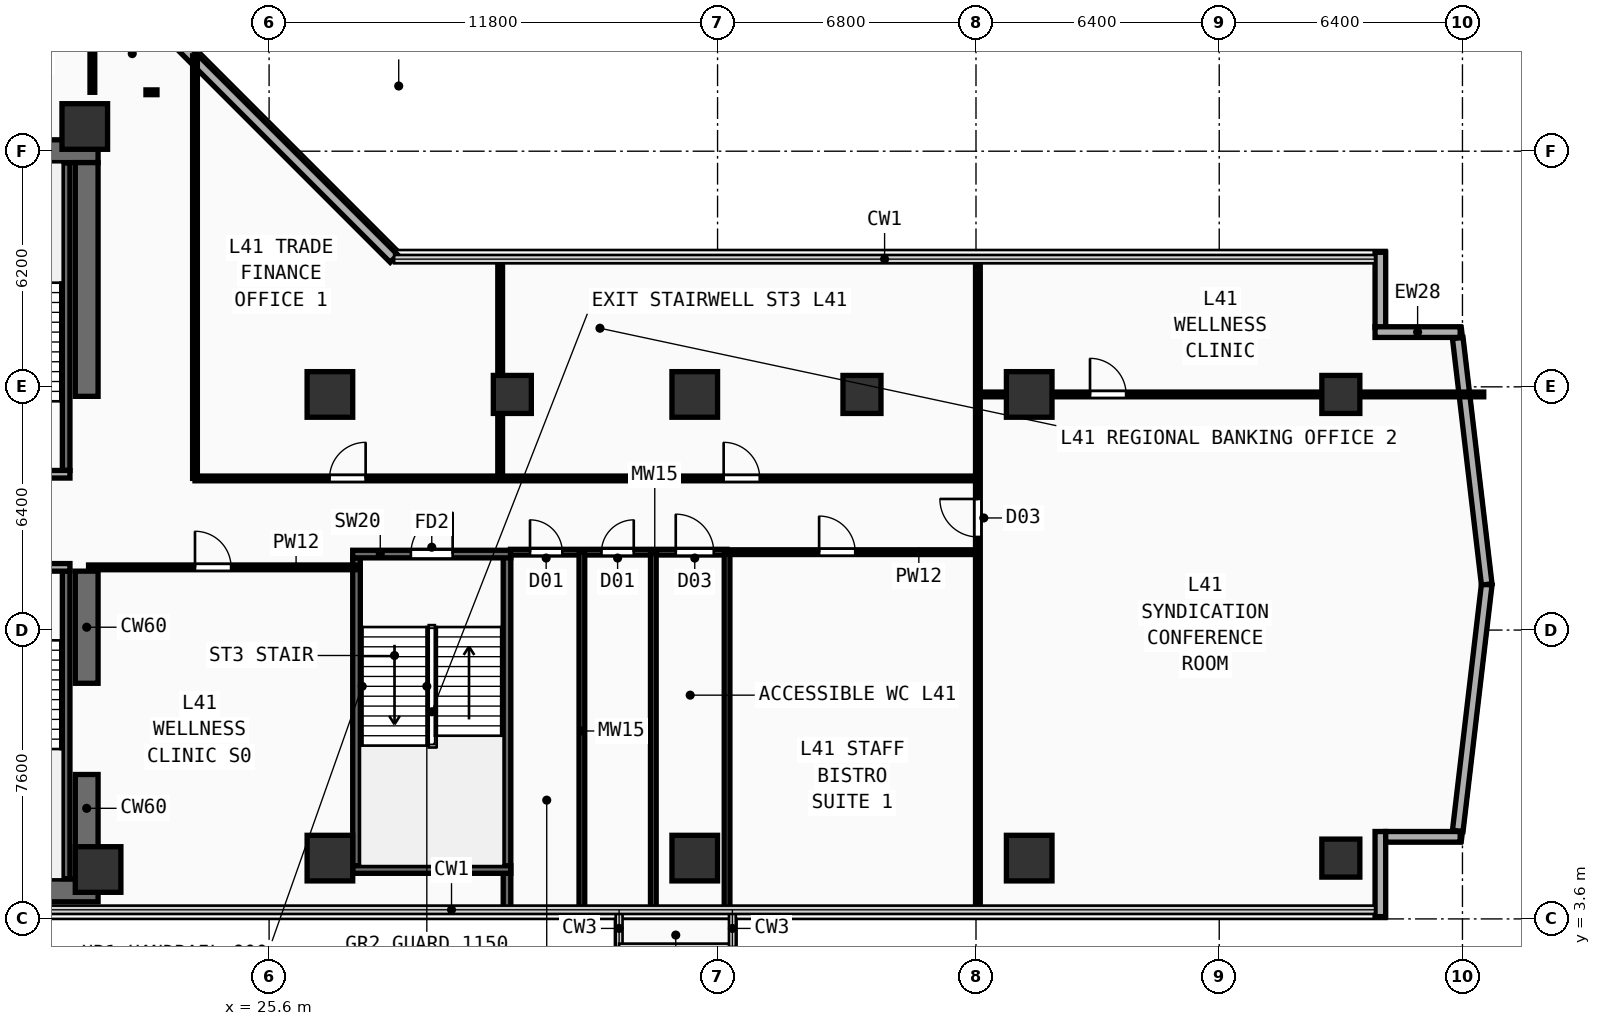
"""IFC4 building model, lengths in metres.
Left out: names, types, materials, properties, quantities, classifications, styles, units other than length and angle.
Written with IfcOpenShell. Run it as: python <this file> out.ifc"""

import sys

from ifc_helpers import new_model, si_unit, direction, frame, frame_2d, origin, origin_2d, place, context, subcontext, project, spatial, rectangle, extrude, element, fill, save


model = new_model("IFC4")
c1 = context("Model", 3, precision=1e-05, world=origin(), true_north=direction((0.0, 1.0)))
c2 = subcontext(c1, "Body", "Model", "MODEL_VIEW")
j1 = project(units=[si_unit("LENGTHUNIT", "METRE"), si_unit("PLANEANGLEUNIT", "RADIAN")], contexts=[c1])
p1 = place(None, origin())
s1 = spatial("IfcSite", under=j1, at=p1, CompositionType="ELEMENT")
p2 = place(p1, origin())
s2 = spatial("IfcBuilding", under=s1, at=p2, CompositionType="ELEMENT")
p3 = place(p2, frame((0.0, 0.0, 161.4)))
s3 = spatial("IfcBuildingStorey", under=s2, at=p3, CompositionType="ELEMENT", Elevation=161.4)
for number, where, z_axis, x_axis in (
    (1, (7.15, 4.35, 0.0), (0.0, 0.0, 1.0), (1.0, 0.0, 0.0)),
    (2, (7.15, 23.8, 0.0), (0.0, 0.0, 1.0), (1.0, 0.0, 0.0)),
):
    element("IfcWall", number, at=place(p3, frame(where, z_axis=z_axis, x_axis=x_axis)), inside=s3, PredefinedType="SHEAR", context=c2, shape_type="SweptSolid", body=[
        extrude(rectangle(XDim=13.95, YDim=0.6, at=frame_2d((6.975, 0.0))), origin(), (0.0, 0.0, 1.0), 3.56),
    ])
p4 = place(p3, frame((20.8, 4.65, 0.0), z_axis=(0.0, 0.0, 1.0), x_axis=(0.0, 1.0, 0.0)))
e3 = element("IfcWall", 3, at=p4, inside=s3, PredefinedType="SHEAR", context=c2, shape_type="SweptSolid", body=[
    extrude(rectangle(XDim=2.75, YDim=0.6, at=frame_2d((1.375, 0.0))), origin(), (0.0, 0.0, 1.0), 3.56),
])
p5 = place(p3, frame((20.8, 9.8, 0.0), z_axis=(0.0, 0.0, 1.0), x_axis=(0.0, 1.0, 0.0)))
e4 = element("IfcWall", 4, at=p5, inside=s3, PredefinedType="SHEAR", context=c2, shape_type="SweptSolid", body=[
    extrude(rectangle(XDim=2.95, YDim=0.6, at=frame_2d((1.475, 0.0))), origin(), (0.0, 0.0, 1.0), 3.56),
])
p6 = place(p3, frame((20.8, 17.35, 0.0), z_axis=(0.0, 0.0, 1.0), x_axis=(0.0, 1.0, 0.0)))
e5 = element("IfcWall", 5, at=p6, inside=s3, PredefinedType="SHEAR", context=c2, shape_type="SweptSolid", body=[
    extrude(rectangle(XDim=6.15, YDim=0.6, at=frame_2d((3.075, 0.0))), origin(), (0.0, 0.0, 1.0), 3.56),
])
for number, where, z_axis, x_axis in (
    (6, (21.1, 4.9, 0.0), (0.0, 0.0, 1.0), (1.0, 0.0, 0.0)),
    (7, (20.75, 24.45, 0.0), (0.0, 0.0, 1.0), (1.0, 0.0, 0.0)),
    (8, (27.2, 5.2, 0.0), (0.0, 0.0, 1.0), (1.0, 0.0, 0.0)),
    (9, (36.8, 5.2, 0.0), (0.0, 0.0, 1.0), (1.0, 0.0, 0.0)),
    (10, (45.6, 5.2, 0.0), (0.0, 0.0, 1.0), (1.0, 0.0, 0.0)),
    (11, (27.2, 17.4, 0.0), (0.0, 0.0, 1.0), (1.0, 0.0, 0.0)),
    (12, (36.8, 17.4, 0.0), (0.0, 0.0, 1.0), (1.0, 0.0, 0.0)),
    (13, (45.6, 17.4, 0.0), (0.0, 0.0, 1.0), (1.0, 0.0, 0.0)),
):
    element("IfcColumn", number, at=place(p3, frame(where, z_axis=z_axis, x_axis=x_axis)), inside=s3, PredefinedType="COLUMN", context=c2, shape_type="SweptSolid", body=[
        extrude(rectangle(XDim=1.2, YDim=1.2, at=origin_2d()), origin(), (0.0, 0.0, 1.0), 3.56),
    ])
for number, where, z_axis, x_axis in (
    (14, (53.8, 5.2, 0.0), (0.0, 0.0, 1.0), (1.0, 0.0, 0.0)),
    (15, (53.8, 17.4, 0.0), (0.0, 0.0, 1.0), (1.0, 0.0, 0.0)),
    (16, (32.0, 17.4, 0.0), (0.0, 0.0, 1.0), (1.0, 0.0, 0.0)),
    (17, (41.2, 17.4, 0.0), (0.0, 0.0, 1.0), (1.0, 0.0, 0.0)),
):
    element("IfcColumn", number, at=place(p3, frame(where, z_axis=z_axis, x_axis=x_axis)), inside=s3, PredefinedType="COLUMN", context=c2, shape_type="SweptSolid", body=[
        extrude(rectangle(XDim=1.0, YDim=1.0, at=origin_2d()), origin(), (0.0, 0.0, 1.0), 3.56),
    ])
p7 = place(p3, frame((54.84, 3.66, 0.0), z_axis=(0.0, 0.0, 1.0), x_axis=(0.0, 1.0, 0.0)))
e18 = element("IfcWall", 18, at=p7, inside=s3, PredefinedType="SOLIDWALL", context=c2, shape_type="SweptSolid", body=[
    extrude(rectangle(XDim=2.24, YDim=0.28, at=frame_2d((1.12, 0.0))), origin(), (0.0, 0.0, 1.0), 3.56),
])
p8 = place(p3, frame((54.98, 5.76, 0.0), z_axis=(0.0, 0.0, 1.0), x_axis=(1.0, 0.0, 0.0)))
e19 = element("IfcWall", 19, at=p8, inside=s3, PredefinedType="SOLIDWALL", context=c2, shape_type="SweptSolid", body=[
    extrude(rectangle(XDim=1.96, YDim=0.28, at=frame_2d((0.98, 0.0))), origin(), (0.0, 0.0, 1.0), 3.56),
])
p9 = place(p3, frame((54.84, 19.165, 0.0), z_axis=(0.0, 0.0, 1.0), x_axis=(0.0, 1.0, 0.0)))
e20 = element("IfcWall", 20, at=p9, inside=s3, PredefinedType="SOLIDWALL", context=c2, shape_type="SweptSolid", body=[
    extrude(rectangle(XDim=1.975, YDim=0.28, at=frame_2d((0.987, 0.0))), origin(), (0.0, 0.0, 1.0), 3.56),
])
p10 = place(p3, frame((54.7, 19.04, 0.0), z_axis=(0.0, 0.0, 1.0), x_axis=(1.0, 0.0, 0.0)))
e21 = element("IfcWall", 21, at=p10, inside=s3, PredefinedType="SOLIDWALL", context=c2, shape_type="SweptSolid", body=[
    extrude(rectangle(XDim=2.24, YDim=0.28, at=frame_2d((1.12, 0.0))), origin(), (0.0, 0.0, 1.0), 3.56),
])
p11 = place(p3, frame((28.885, 20.975, 0.0), z_axis=(0.0, 0.0, 1.0), x_axis=(-0.707106781187, 0.707106781187, 0.0)))
e22 = element("IfcWall", 22, at=p11, inside=s3, PredefinedType="SOLIDWALL", context=c2, shape_type="SweptSolid", body=[
    extrude(rectangle(XDim=9.207, YDim=0.28, at=frame_2d((4.603, 0.0))), origin(), (0.0, 0.0, 1.0), 3.56),
])
for number, where, z_axis, x_axis in (
    (23, (56.876, 5.917, 0.0), (0.0, 0.0, 1.0), (0.117, 0.993, 0.0)),
    (24, (57.639, 12.401, 0.0), (0.0, 0.0, 1.0), (-0.117, 0.993, 0.0)),
):
    element("IfcWall", number, at=place(p3, frame(where, z_axis=z_axis, x_axis=x_axis)), inside=s3, PredefinedType="SOLIDWALL", context=c2, shape_type="SweptSolid", body=[
        extrude(rectangle(XDim=6.527, YDim=0.28, at=frame_2d((3.263, 0.0))), origin(), (0.0, 0.0, 1.0), 3.56),
    ])
p12 = place(p3, frame((20.26, 4.66, 0.0), z_axis=(0.0, 0.0, 1.0), x_axis=(0.0, 1.0, 0.0)))
e25 = element("IfcWall", 25, at=p12, inside=s3, PredefinedType="SHEAR", context=c2, shape_type="SweptSolid", body=[
    extrude(rectangle(XDim=8.09, YDim=0.2, at=frame_2d((4.045, 0.0))), origin(), (0.0, 0.0, 1.0), 3.56),
])
p13 = place(p3, frame((16.4, 12.85, 0.0), z_axis=(0.0, 0.0, 1.0), x_axis=(1.0, 0.0, 0.0)))
e26 = element("IfcWall", 26, at=p13, inside=s3, PredefinedType="PARTITIONING", context=c2, shape_type="SweptSolid", body=[
    extrude(rectangle(XDim=3.96, YDim=0.2, at=frame_2d((1.98, 0.0))), origin(), (0.0, 0.0, 1.0), 3.56),
])
p14 = place(p13, frame((1.304, 0.0, 0.0)))
e27 = element("IfcOpeningElement", 27, at=p14, cuts=e26, PredefinedType="OPENING", context=c2, shape_type="SweptSolid", body=[
    extrude(rectangle(XDim=1.1, YDim=2.2, at=frame_2d((0.55, 1.1))), frame((0.0, 0.11, 0.0), z_axis=(0.0, -1.0, 0.0), x_axis=(1.0, 0.0, 0.0)), (0.0, 0.0, 1.0), 0.22),
])
p15 = place(p3, frame((20.26, 15.4, 0.0), z_axis=(0.0, 0.0, 1.0), x_axis=(0.0, 1.0, 0.0)))
e28 = element("IfcWall", 28, at=p15, inside=s3, PredefinedType="SHEAR", context=c2, shape_type="SweptSolid", body=[
    extrude(rectangle(XDim=8.09, YDim=0.2, at=frame_2d((4.045, 0.0))), origin(), (0.0, 0.0, 1.0), 3.56),
])
p16 = place(p3, frame((16.41, 15.3, 0.0), z_axis=(0.0, 0.0, 1.0), x_axis=(1.0, 0.0, 0.0)))
e29 = element("IfcWall", 29, at=p16, inside=s3, PredefinedType="PARTITIONING", context=c2, shape_type="SweptSolid", body=[
    extrude(rectangle(XDim=3.95, YDim=0.2, at=frame_2d((1.975, 0.0))), origin(), (0.0, 0.0, 1.0), 3.56),
])
p17 = place(p16, frame((1.294, 0.0, 0.0)))
e30 = element("IfcOpeningElement", 30, at=p17, cuts=e29, PredefinedType="OPENING", context=c2, shape_type="SweptSolid", body=[
    extrude(rectangle(XDim=1.1, YDim=2.2, at=frame_2d((0.55, 1.1))), frame((0.0, 0.11, 0.0), z_axis=(0.0, -1.0, 0.0), x_axis=(1.0, 0.0, 0.0)), (0.0, 0.0, 1.0), 0.22),
])
p18 = place(p3, frame((27.9, 5.0, 0.0), z_axis=(0.0, 0.0, 1.0), x_axis=(0.0, 1.0, 0.0)))
e31 = element("IfcWall", 31, at=p18, inside=s3, PredefinedType="SHEAR", context=c2, shape_type="SweptSolid", body=[
    extrude(rectangle(XDim=8.1, YDim=0.2, at=frame_2d((4.05, 0.0))), origin(), (0.0, 0.0, 1.0), 3.56),
])
p19 = place(p3, frame((31.86, 3.84, 0.0), z_axis=(0.0, 0.0, 1.0), x_axis=(0.0, 1.0, 0.0)))
e32 = element("IfcWall", 32, at=p19, inside=s3, PredefinedType="SHEAR", context=c2, shape_type="SweptSolid", body=[
    extrude(rectangle(XDim=9.41, YDim=0.2, at=frame_2d((4.705, 0.0))), origin(), (0.0, 0.0, 1.0), 3.56),
])
p20 = place(p3, frame((27.8, 4.9, 0.0), z_axis=(0.0, 0.0, 1.0), x_axis=(1.0, 0.0, 0.0)))
e33 = element("IfcWall", 33, at=p20, inside=s3, PredefinedType="SHEAR", context=c2, shape_type="SweptSolid", body=[
    extrude(rectangle(XDim=4.16, YDim=0.2, at=frame_2d((2.08, 0.0))), origin(), (0.0, 0.0, 1.0), 3.56),
])
p21 = place(p3, frame((27.8, 13.2, 0.0), z_axis=(0.0, 0.0, 1.0), x_axis=(1.0, 0.0, 0.0)))
e34 = element("IfcWall", 34, at=p21, inside=s3, PredefinedType="SHEAR", context=c2, shape_type="SweptSolid", body=[
    extrude(rectangle(XDim=4.16, YDim=0.2, at=frame_2d((2.08, 0.0))), origin(), (0.0, 0.0, 1.0), 3.56),
])
p22 = place(p21, frame((1.53, 0.0, 0.0)))
e35 = element("IfcOpeningElement", 35, at=p22, cuts=e34, PredefinedType="OPENING", context=c2, shape_type="SweptSolid", body=[
    extrude(rectangle(XDim=1.1, YDim=2.2, at=frame_2d((0.55, 1.1))), frame((0.0, 0.11, 0.0), z_axis=(0.0, -1.0, 0.0), x_axis=(1.0, 0.0, 0.0)), (0.0, 0.0, 1.0), 0.22),
])
p23 = place(p3, frame((31.95, 13.25, 0.0), z_axis=(0.0, 0.0, 1.0), x_axis=(1.0, 0.0, 0.0)))
e36 = element("IfcWall", 36, at=p23, inside=s3, PredefinedType="PLUMBINGWALL", context=c2, shape_type="SweptSolid", body=[
    extrude(rectangle(XDim=5.7, YDim=0.15, at=frame_2d((2.85, 0.0))), origin(), (0.0, 0.0, 1.0), 3.16),
])
p24 = place(p23, frame((0.515, 0.0, 0.0)))
e37 = element("IfcOpeningElement", 37, at=p24, cuts=e36, PredefinedType="OPENING", context=c2, shape_type="SweptSolid", body=[
    extrude(rectangle(XDim=0.85, YDim=2.15, at=frame_2d((0.425, 1.075))), frame((0.0, 0.085, 0.0), z_axis=(0.0, -1.0, 0.0), x_axis=(1.0, 0.0, 0.0)), (0.0, 0.0, 1.0), 0.17),
])
p25 = place(p23, frame((2.395, 0.0, 0.0)))
e38 = element("IfcOpeningElement", 38, at=p25, cuts=e36, PredefinedType="OPENING", context=c2, shape_type="SweptSolid", body=[
    extrude(rectangle(XDim=0.85, YDim=2.15, at=frame_2d((0.425, 1.075))), frame((0.0, 0.085, 0.0), z_axis=(0.0, -1.0, 0.0), x_axis=(1.0, 0.0, 0.0)), (0.0, 0.0, 1.0), 0.17),
])
p26 = place(p23, frame((4.35, 0.0, 0.0)))
e39 = element("IfcOpeningElement", 39, at=p26, cuts=e36, PredefinedType="OPENING", context=c2, shape_type="SweptSolid", body=[
    extrude(rectangle(XDim=1.0, YDim=2.2, at=frame_2d((0.5, 1.1))), frame((0.0, 0.085, 0.0), z_axis=(0.0, -1.0, 0.0), x_axis=(1.0, 0.0, 0.0)), (0.0, 0.0, 1.0), 0.17),
])
for number, where, z_axis, x_axis in (
    (40, (33.83, 3.84, 0.0), (0.0, 0.0, 1.0), (0.0, 1.0, 0.0)),
    (41, (35.71, 3.84, 0.0), (0.0, 0.0, 1.0), (0.0, 1.0, 0.0)),
    (42, (37.65, 3.84, 0.0), (0.0, 0.0, 1.0), (0.0, 1.0, 0.0)),
):
    element("IfcWall", number, at=place(p3, frame(where, z_axis=z_axis, x_axis=x_axis)), inside=s3, PredefinedType="PLUMBINGWALL", context=c2, shape_type="SweptSolid", body=[
        extrude(rectangle(XDim=9.41, YDim=0.15, at=frame_2d((4.705, 0.0))), origin(), (0.0, 0.0, 1.0), 3.56),
    ])
p27 = place(p3, frame((20.85, 12.85, 0.0), z_axis=(0.0, 0.0, 1.0), x_axis=(1.0, 0.0, 0.0)))
e43 = element("IfcWall", 43, at=p27, inside=s3, PredefinedType="PARTITIONING", context=c2, shape_type="SweptSolid", body=[
    extrude(rectangle(XDim=7.05, YDim=0.125, at=frame_2d((3.525, 0.0))), origin(), (0.0, 0.0, 1.0), 3.56),
])
p28 = place(p27, frame((2.8, 0.0, 0.0)))
e44 = element("IfcOpeningElement", 44, at=p28, cuts=e43, PredefinedType="OPENING", context=c2, shape_type="SweptSolid", body=[
    extrude(rectangle(XDim=0.95, YDim=2.15, at=frame_2d((0.475, 1.075))), frame((0.0, 0.073, 0.0), z_axis=(0.0, -1.0, 0.0), x_axis=(1.0, 0.0, 0.0)), (0.0, 0.0, 1.0), 0.145),
])
p29 = place(p3, frame((20.95, 25.35, 0.0), z_axis=(0.0, 0.0, 1.0), x_axis=(0.0, 1.0, 0.0)))
e45 = element("IfcWall", 45, at=p29, inside=s3, PredefinedType="PARTITIONING", context=c2, shape_type="SweptSolid", body=[
    extrude(rectangle(XDim=9.25, YDim=0.125, at=frame_2d((4.625, 0.0))), origin(), (0.0, 0.0, 1.0), 3.56),
])
p30 = place(p29, frame((3.973, 0.0, 0.0)))
e46 = element("IfcOpeningElement", 46, at=p30, cuts=e45, PredefinedType="OPENING", context=c2, shape_type="SweptSolid", body=[
    extrude(rectangle(XDim=0.85, YDim=2.15, at=frame_2d((0.425, 1.075))), frame((0.0, 0.073, 0.0), z_axis=(0.0, -1.0, 0.0), x_axis=(1.0, 0.0, 0.0)), (0.0, 0.0, 1.0), 0.145),
])
p31 = place(p3, frame((22.65, 25.35, 0.0), z_axis=(0.0, 0.0, 1.0), x_axis=(-1.0, 0.0, 0.0)))
e47 = element("IfcWall", 47, at=p31, inside=s3, PredefinedType="PARTITIONING", context=c2, shape_type="SweptSolid", body=[
    extrude(rectangle(XDim=0.29, YDim=0.125, at=frame_2d((0.145, 0.0))), origin(), (0.0, 0.0, 1.0), 3.56),
])
p32 = place(p3, frame((37.65, 13.25, 0.0), z_axis=(0.0, 0.0, 1.0), x_axis=(1.0, 0.0, 0.0)))
e48 = element("IfcWall", 48, at=p32, inside=s3, PredefinedType="PARTITIONING", context=c2, shape_type="SweptSolid", body=[
    extrude(rectangle(XDim=6.6, YDim=0.125, at=frame_2d((3.3, 0.0))), origin(), (0.0, 0.0, 1.0), 3.16),
])
p33 = place(p32, frame((2.422, 0.0, 0.0)))
e49 = element("IfcOpeningElement", 49, at=p33, cuts=e48, PredefinedType="OPENING", context=c2, shape_type="SweptSolid", body=[
    extrude(rectangle(XDim=0.95, YDim=2.15, at=frame_2d((0.475, 1.075))), frame((0.0, 0.073, 0.0), z_axis=(0.0, -1.0, 0.0), x_axis=(1.0, 0.0, 0.0)), (0.0, 0.0, 1.0), 0.145),
])
p34 = place(p3, frame((44.25, 3.84, 0.0), z_axis=(0.0, 0.0, 1.0), x_axis=(0.0, 1.0, 0.0)))
e50 = element("IfcWall", 50, at=p34, inside=s3, PredefinedType="PARTITIONING", context=c2, shape_type="SweptSolid", body=[
    extrude(rectangle(XDim=17.12, YDim=0.125, at=frame_2d((8.56, 0.0))), origin(), (0.0, 0.0, 1.0), 3.56),
])
p35 = place(p34, frame((9.81, 0.0, 0.0)))
e51 = element("IfcOpeningElement", 51, at=p35, cuts=e50, PredefinedType="OPENING", context=c2, shape_type="SweptSolid", body=[
    extrude(rectangle(XDim=1.0, YDim=2.2, at=frame_2d((0.5, 1.1))), frame((0.0, 0.073, 0.0), z_axis=(0.0, -1.0, 0.0), x_axis=(1.0, 0.0, 0.0)), (0.0, 0.0, 1.0), 0.145),
])
p36 = place(p3, frame((44.25, 17.4, 0.0), z_axis=(0.0, 0.0, 1.0), x_axis=(1.0, 0.0, 0.0)))
e52 = element("IfcWall", 52, at=p36, inside=s3, PredefinedType="PARTITIONING", context=c2, shape_type="SweptSolid", body=[
    extrude(rectangle(XDim=13.31, YDim=0.125, at=frame_2d((6.655, 0.0))), origin(), (0.0, 0.0, 1.0), 3.2),
])
p37 = place(p36, frame((2.95, 0.0, 0.0)))
e53 = element("IfcOpeningElement", 53, at=p37, cuts=e52, PredefinedType="OPENING", context=c2, shape_type="SweptSolid", body=[
    extrude(rectangle(XDim=0.95, YDim=2.15, at=frame_2d((0.475, 1.075))), frame((0.0, 0.073, 0.0), z_axis=(0.0, -1.0, 0.0), x_axis=(1.0, 0.0, 0.0)), (0.0, 0.0, 1.0), 0.145),
])
p38 = place(p3, frame((23.65, 15.19, 0.0), z_axis=(0.0, 0.0, 1.0), x_axis=(0.0, 1.0, 0.0)))
e54 = element("IfcWall", 54, at=p38, inside=s3, PredefinedType="PARTITIONING", context=c2, shape_type="SweptSolid", body=[
    extrude(rectangle(XDim=11.12, YDim=0.125, at=frame_2d((5.56, 0.0))), origin(), (0.0, 0.0, 1.0), 3.56),
])
p39 = place(p3, frame((23.65, 15.19, 0.0), z_axis=(0.0, 0.0, 1.0), x_axis=(1.0, 0.0, 0.0)))
e55 = element("IfcWall", 55, at=p39, inside=s3, PredefinedType="PARTITIONING", context=c2, shape_type="SweptSolid", body=[
    extrude(rectangle(XDim=20.6, YDim=0.125, at=frame_2d((10.3, 0.0))), origin(), (0.0, 0.0, 1.0), 3.56),
])
p40 = place(p39, frame((3.54, 0.0, 0.0)))
e56 = element("IfcOpeningElement", 56, at=p40, cuts=e55, PredefinedType="OPENING", context=c2, shape_type="SweptSolid", body=[
    extrude(rectangle(XDim=0.95, YDim=2.15, at=frame_2d((0.475, 1.075))), frame((0.0, 0.073, 0.0), z_axis=(0.0, -1.0, 0.0), x_axis=(1.0, 0.0, 0.0)), (0.0, 0.0, 1.0), 0.145),
])
p41 = place(p39, frame((13.91, 0.0, 0.0)))
e57 = element("IfcOpeningElement", 57, at=p41, cuts=e55, PredefinedType="OPENING", context=c2, shape_type="SweptSolid", body=[
    extrude(rectangle(XDim=0.95, YDim=2.15, at=frame_2d((0.475, 1.075))), frame((0.0, 0.073, 0.0), z_axis=(0.0, -1.0, 0.0), x_axis=(1.0, 0.0, 0.0)), (0.0, 0.0, 1.0), 0.145),
])
p42 = place(p3, frame((31.68, 15.19, 0.0), z_axis=(0.0, 0.0, 1.0), x_axis=(0.0, 1.0, 0.0)))
e58 = element("IfcWall", 58, at=p42, inside=s3, PredefinedType="PARTITIONING", context=c2, shape_type="SweptSolid", body=[
    extrude(rectangle(XDim=5.77, YDim=0.125, at=frame_2d((2.885, 0.0))), origin(), (0.0, 0.0, 1.0), 3.56),
])
p43 = place(p22, frame((1.1, 0.0, 0.0), z_axis=(0.0, 0.0, 1.0), x_axis=(-1.0, 0.0, 0.0)))
e59 = element("IfcDoor", 59, at=p43, inside=s3, OperationType="SINGLE_SWING_LEFT", PredefinedType="DOOR", context=c2, shape_type="SweptSolid", body=[
    extrude(rectangle(XDim=1.1, YDim=2.2, at=frame_2d((0.55, 1.1))), frame((0.0, 0.025, 0.0), z_axis=(0.0, -1.0, 0.0), x_axis=(1.0, 0.0, 0.0)), (0.0, 0.0, 1.0), 0.05),
])
fill(e35, e59)
p44 = place(p24, origin())
e60 = element("IfcDoor", 60, at=p44, inside=s3, OperationType="SINGLE_SWING_LEFT", PredefinedType="DOOR", context=c2, shape_type="SweptSolid", body=[
    extrude(rectangle(XDim=0.85, YDim=2.15, at=frame_2d((0.425, 1.075))), frame((0.0, 0.025, 0.0), z_axis=(0.0, -1.0, 0.0), x_axis=(1.0, 0.0, 0.0)), (0.0, 0.0, 1.0), 0.05),
])
fill(e37, e60)
p45 = place(p25, origin())
e61 = element("IfcDoor", 61, at=p45, inside=s3, OperationType="SINGLE_SWING_RIGHT", PredefinedType="DOOR", context=c2, shape_type="SweptSolid", body=[
    extrude(rectangle(XDim=0.85, YDim=2.15, at=frame_2d((0.425, 1.075))), frame((0.0, 0.025, 0.0), z_axis=(0.0, -1.0, 0.0), x_axis=(1.0, 0.0, 0.0)), (0.0, 0.0, 1.0), 0.05),
])
fill(e38, e61)
p46 = place(p26, origin())
e62 = element("IfcDoor", 62, at=p46, inside=s3, OperationType="SINGLE_SWING_LEFT", PredefinedType="DOOR", context=c2, shape_type="SweptSolid", body=[
    extrude(rectangle(XDim=1.0, YDim=2.2, at=frame_2d((0.5, 1.1))), frame((0.0, 0.025, 0.0), z_axis=(0.0, -1.0, 0.0), x_axis=(1.0, 0.0, 0.0)), (0.0, 0.0, 1.0), 0.05),
])
fill(e39, e62)
p47 = place(p28, origin())
e63 = element("IfcDoor", 63, at=p47, inside=s3, OperationType="SINGLE_SWING_LEFT", PredefinedType="DOOR", context=c2, shape_type="SweptSolid", body=[
    extrude(rectangle(XDim=0.95, YDim=2.15, at=frame_2d((0.475, 1.075))), frame((0.0, 0.025, 0.0), z_axis=(0.0, -1.0, 0.0), x_axis=(1.0, 0.0, 0.0)), (0.0, 0.0, 1.0), 0.05),
])
fill(e44, e63)
p48 = place(p33, origin())
e64 = element("IfcDoor", 64, at=p48, inside=s3, OperationType="SINGLE_SWING_LEFT", PredefinedType="DOOR", context=c2, shape_type="SweptSolid", body=[
    extrude(rectangle(XDim=0.95, YDim=2.15, at=frame_2d((0.475, 1.075))), frame((0.0, 0.025, 0.0), z_axis=(0.0, -1.0, 0.0), x_axis=(1.0, 0.0, 0.0)), (0.0, 0.0, 1.0), 0.05),
])
fill(e49, e64)
p49 = place(p35, origin())
e65 = element("IfcDoor", 65, at=p49, inside=s3, OperationType="SINGLE_SWING_RIGHT", PredefinedType="DOOR", context=c2, shape_type="SweptSolid", body=[
    extrude(rectangle(XDim=1.0, YDim=2.2, at=frame_2d((0.5, 1.1))), frame((0.0, 0.025, 0.0), z_axis=(0.0, -1.0, 0.0), x_axis=(1.0, 0.0, 0.0)), (0.0, 0.0, 1.0), 0.05),
])
fill(e51, e65)
p50 = place(p37, origin())
e66 = element("IfcDoor", 66, at=p50, inside=s3, OperationType="SINGLE_SWING_LEFT", PredefinedType="DOOR", context=c2, shape_type="SweptSolid", body=[
    extrude(rectangle(XDim=0.95, YDim=2.15, at=frame_2d((0.475, 1.075))), frame((0.0, 0.025, 0.0), z_axis=(0.0, -1.0, 0.0), x_axis=(1.0, 0.0, 0.0)), (0.0, 0.0, 1.0), 0.05),
])
fill(e53, e66)
p51 = place(p40, origin())
e67 = element("IfcDoor", 67, at=p51, inside=s3, OperationType="SINGLE_SWING_RIGHT", PredefinedType="DOOR", context=c2, shape_type="SweptSolid", body=[
    extrude(rectangle(XDim=0.95, YDim=2.15, at=frame_2d((0.475, 1.075))), frame((0.0, 0.025, 0.0), z_axis=(0.0, -1.0, 0.0), x_axis=(1.0, 0.0, 0.0)), (0.0, 0.0, 1.0), 0.05),
])
fill(e56, e67)
p52 = place(p41, origin())
e68 = element("IfcDoor", 68, at=p52, inside=s3, OperationType="SINGLE_SWING_LEFT", PredefinedType="DOOR", context=c2, shape_type="SweptSolid", body=[
    extrude(rectangle(XDim=0.95, YDim=2.15, at=frame_2d((0.475, 1.075))), frame((0.0, 0.025, 0.0), z_axis=(0.0, -1.0, 0.0), x_axis=(1.0, 0.0, 0.0)), (0.0, 0.0, 1.0), 0.05),
])
fill(e57, e68)
save(model, sys.argv[1])
